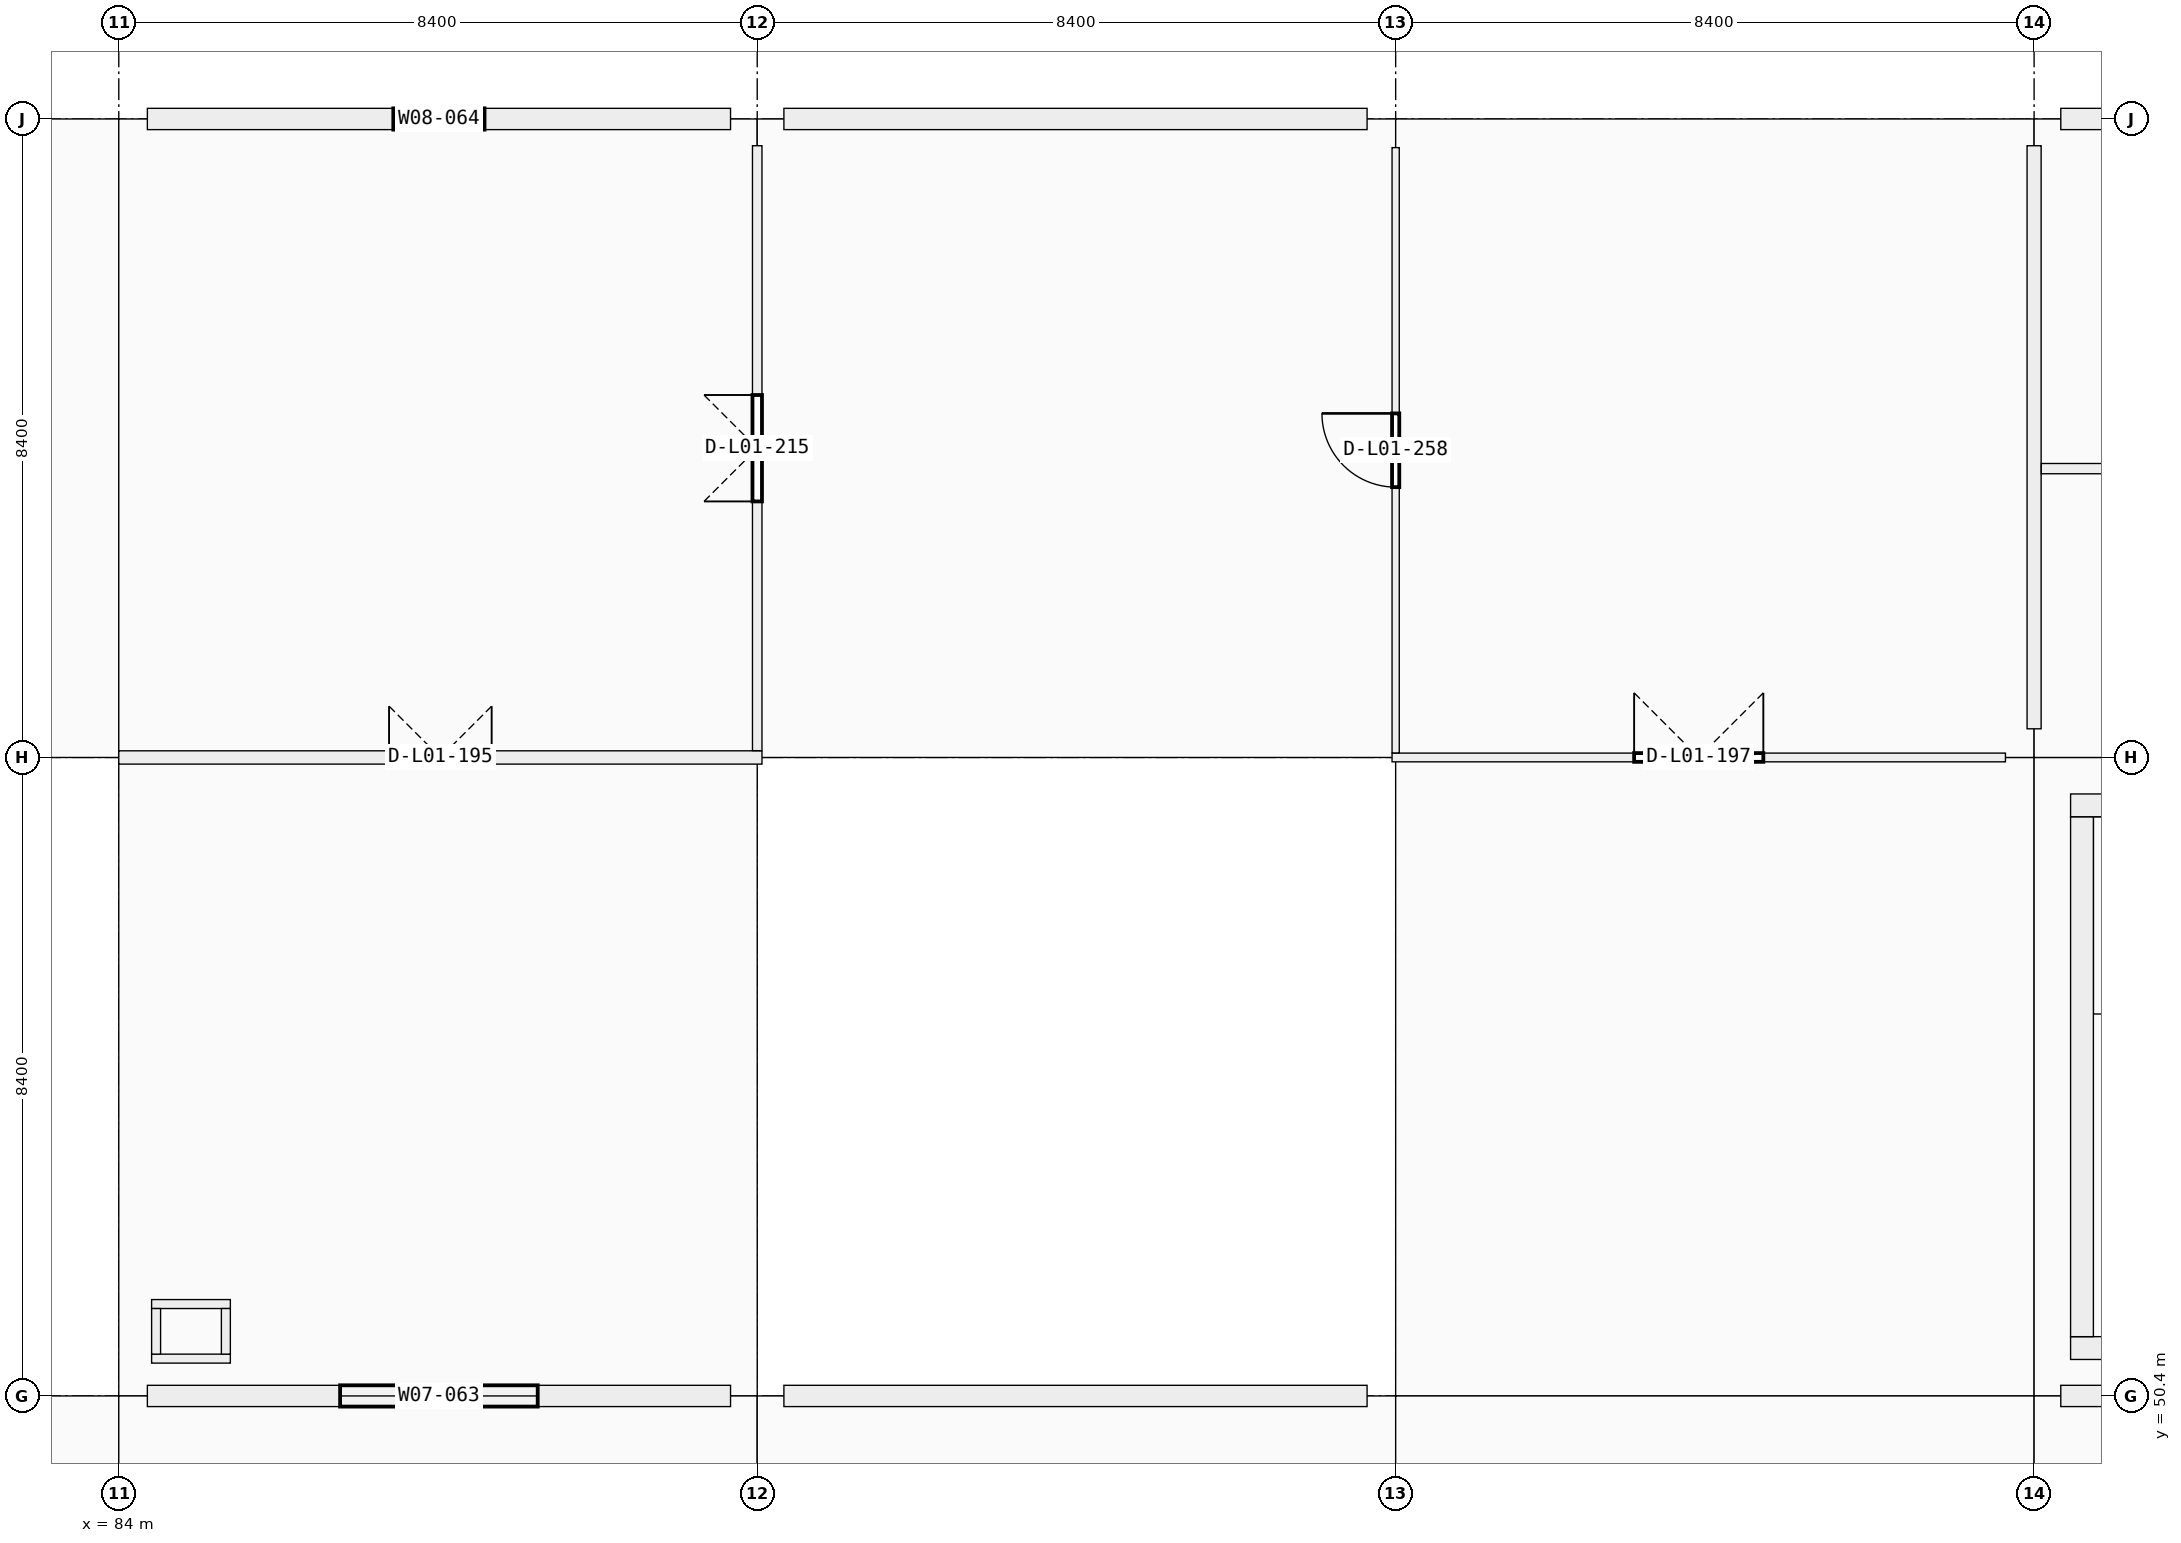
"""IFC4 building model, lengths in metres.
Left out: names, types, materials, properties, quantities, classifications, styles, units other than length and angle.
Written with IfcOpenShell. Run it as: python <this file> out.ifc"""

import sys

from ifc_helpers import new_model, si_unit, direction, frame, frame_2d, origin, origin_2d, place, context, subcontext, project, spatial, rectangle, extrude, element, fill, save


model = new_model("IFC4")
c1 = context("Model", 3, precision=1e-05, world=origin(), true_north=direction((0.0, 1.0)))
c2 = subcontext(c1, "Body", "Model", "MODEL_VIEW")
j1 = project(units=[si_unit("LENGTHUNIT", "METRE"), si_unit("PLANEANGLEUNIT", "RADIAN")], contexts=[c1])
p1 = place(None, origin())
s1 = spatial("IfcSite", under=j1, at=p1, CompositionType="ELEMENT")
p2 = place(p1, origin())
s2 = spatial("IfcBuilding", under=s1, at=p2, CompositionType="ELEMENT")
p3 = place(p2, frame((0.0, 0.0, 5.76)))
s3 = spatial("IfcBuildingStorey", under=s2, at=p3, CompositionType="ELEMENT", Elevation=5.76)
for number, where, z_axis, x_axis in (
    (1, (84.0, 50.4, 0.0), (0.0, 0.0, 1.0), (1.0, 0.0, 0.0)),
    (2, (84.0, 67.2, 0.0), (0.0, 0.0, 1.0), (1.0, 0.0, 0.0)),
):
    element("IfcColumn", number, at=place(p3, frame(where, z_axis=z_axis, x_axis=x_axis)), inside=s3, PredefinedType="COLUMN", context=c2, shape_type="SweptSolid", body=[
        extrude(rectangle(XDim=0.75, YDim=0.75, at=origin_2d()), origin(), (0.0, 0.0, 1.0), 4.5),
    ])
for number, where, z_axis, x_axis in (
    (3, (92.4, 50.4, 0.0), (0.0, 0.0, 1.0), (1.0, 0.0, 0.0)),
    (4, (92.4, 67.2, 0.0), (0.0, 0.0, 1.0), (1.0, 0.0, 0.0)),
):
    element("IfcColumn", number, at=place(p3, frame(where, z_axis=z_axis, x_axis=x_axis)), inside=s3, PredefinedType="COLUMN", context=c2, shape_type="SweptSolid", body=[
        extrude(rectangle(XDim=0.7, YDim=0.7, at=origin_2d()), origin(), (0.0, 0.0, 1.0), 4.5),
    ])
for number, where, z_axis, x_axis in (
    (5, (100.8, 50.4, 0.0), (0.0, 0.0, 1.0), (1.0, 0.0, 0.0)),
    (6, (100.8, 67.2, 0.0), (0.0, 0.0, 1.0), (1.0, 0.0, 0.0)),
):
    element("IfcColumn", number, at=place(p3, frame(where, z_axis=z_axis, x_axis=x_axis)), inside=s3, PredefinedType="COLUMN", context=c2, shape_type="SweptSolid", body=[
        extrude(rectangle(XDim=0.75, YDim=0.75, at=origin_2d()), origin(), (0.0, 0.0, 1.0), 4.5),
    ])
p4 = place(p3, frame((109.2, 50.4, 0.0), z_axis=(0.0, 0.0, 1.0), x_axis=(1.0, 0.0, 0.0)))
e7 = element("IfcColumn", 7, at=p4, inside=s3, PredefinedType="COLUMN", context=c2, shape_type="SweptSolid", body=[
    extrude(rectangle(XDim=0.7, YDim=0.7, at=origin_2d()), origin(), (0.0, 0.0, 1.0), 4.5),
])
p5 = place(p3, frame((109.2, 58.8, 0.0), z_axis=(0.0, 0.0, 1.0), x_axis=(1.0, 0.0, 0.0)))
e8 = element("IfcColumn", 8, at=p5, inside=s3, PredefinedType="COLUMN", context=c2, shape_type="SweptSolid", body=[
    extrude(rectangle(XDim=0.75, YDim=0.75, at=origin_2d()), origin(), (0.0, 0.0, 1.0), 4.5),
])
p6 = place(p3, frame((109.2, 67.2, 0.0), z_axis=(0.0, 0.0, 1.0), x_axis=(1.0, 0.0, 0.0)))
e9 = element("IfcColumn", 9, at=p6, inside=s3, PredefinedType="COLUMN", context=c2, shape_type="SweptSolid", body=[
    extrude(rectangle(XDim=0.7, YDim=0.7, at=origin_2d()), origin(), (0.0, 0.0, 1.0), 4.5),
])
p7 = place(p3, frame((92.049, 50.4, 0.0), z_axis=(0.0, 0.0, 1.0), x_axis=(-1.0, 0.0, 0.0)))
e10 = element("IfcWall", 10, at=p7, inside=s3, PredefinedType="SOLIDWALL", context=c2, shape_type="SweptSolid", body=[
    extrude(rectangle(XDim=7.673, YDim=0.28, at=frame_2d((3.836, 0.0))), origin(), (0.0, 0.0, 1.0), 3.4),
])
p8 = place(p7, frame((2.537, 0.0, 0.9)))
e11 = element("IfcOpeningElement", 11, at=p8, cuts=e10, PredefinedType="OPENING", context=c2, shape_type="SweptSolid", body=[
    extrude(rectangle(XDim=2.6, YDim=2.1, at=frame_2d((1.3, 1.05))), frame((0.0, 0.14, 0.0), z_axis=(0.0, -1.0, 0.0), x_axis=(1.0, 0.0, 0.0)), (0.0, 0.0, 1.0), 0.28),
])
p9 = place(p3, frame((84.376, 67.2, 0.0), z_axis=(0.0, 0.0, 1.0), x_axis=(1.0, 0.0, 0.0)))
e12 = element("IfcWall", 12, at=p9, inside=s3, PredefinedType="SOLIDWALL", context=c2, shape_type="SweptSolid", body=[
    extrude(rectangle(XDim=7.673, YDim=0.28, at=frame_2d((3.836, 0.0))), origin(), (0.0, 0.0, 1.0), 3.4),
])
p10 = place(p9, frame((3.236, 0.0, 0.9)))
e13 = element("IfcOpeningElement", 13, at=p10, cuts=e12, PredefinedType="OPENING", context=c2, shape_type="SweptSolid", body=[
    extrude(rectangle(XDim=1.2, YDim=2.1, at=frame_2d((0.6, 1.05))), frame((0.0, 0.14, 0.0), z_axis=(0.0, -1.0, 0.0), x_axis=(1.0, 0.0, 0.0)), (0.0, 0.0, 1.0), 0.28),
])
p11 = place(p3, frame((100.424, 50.4, 0.0), z_axis=(0.0, 0.0, 1.0), x_axis=(-1.0, 0.0, 0.0)))
e14 = element("IfcWall", 14, at=p11, inside=s3, PredefinedType="SOLIDWALL", context=c2, shape_type="SweptSolid", body=[
    extrude(rectangle(XDim=7.673, YDim=0.28, at=frame_2d((3.836, 0.0))), origin(), (0.0, 0.0, 1.0), 3.4),
])
p12 = place(p11, frame((2.736, 0.0, 0.9)))
e15 = element("IfcOpeningElement", 15, at=p12, cuts=e14, PredefinedType="OPENING", context=c2, shape_type="SweptSolid", body=[
    extrude(rectangle(XDim=2.2, YDim=1.75, at=frame_2d((1.1, 0.875))), frame((0.0, 0.14, 0.0), z_axis=(0.0, -1.0, 0.0), x_axis=(1.0, 0.0, 0.0)), (0.0, 0.0, 1.0), 0.28),
])
p13 = place(p3, frame((92.751, 67.2, 0.0), z_axis=(0.0, 0.0, 1.0), x_axis=(1.0, 0.0, 0.0)))
e16 = element("IfcWall", 16, at=p13, inside=s3, PredefinedType="SOLIDWALL", context=c2, shape_type="SweptSolid", body=[
    extrude(rectangle(XDim=7.673, YDim=0.28, at=frame_2d((3.836, 0.0))), origin(), (0.0, 0.0, 1.0), 3.4),
])
p14 = place(p13, frame((2.437, 0.0, 0.9)))
e17 = element("IfcOpeningElement", 17, at=p14, cuts=e16, PredefinedType="OPENING", context=c2, shape_type="SweptSolid", body=[
    extrude(rectangle(XDim=2.8, YDim=1.75, at=frame_2d((1.4, 0.875))), frame((0.0, 0.14, 0.0), z_axis=(0.0, -1.0, 0.0), x_axis=(1.0, 0.0, 0.0)), (0.0, 0.0, 1.0), 0.28),
])
p15 = place(p3, frame((117.224, 50.4, 0.0), z_axis=(0.0, 0.0, 1.0), x_axis=(-1.0, 0.0, 0.0)))
e18 = element("IfcWall", 18, at=p15, inside=s3, PredefinedType="SOLIDWALL", context=c2, shape_type="SweptSolid", body=[
    extrude(rectangle(XDim=7.673, YDim=0.28, at=frame_2d((3.836, 0.0))), origin(), (0.0, 0.0, 1.0), 3.4),
])
p16 = place(p3, frame((109.551, 67.2, 0.0), z_axis=(0.0, 0.0, 1.0), x_axis=(1.0, 0.0, 0.0)))
e19 = element("IfcWall", 19, at=p16, inside=s3, PredefinedType="SOLIDWALL", context=c2, shape_type="SweptSolid", body=[
    extrude(rectangle(XDim=7.723, YDim=0.28, at=frame_2d((3.861, 0.0))), origin(), (0.0, 0.0, 1.0), 3.4),
])
p17 = place(p16, frame((3.162, 0.0, 0.9)))
e20 = element("IfcOpeningElement", 20, at=p17, cuts=e19, PredefinedType="OPENING", context=c2, shape_type="SweptSolid", body=[
    extrude(rectangle(XDim=1.4, YDim=1.75, at=frame_2d((0.7, 0.875))), frame((0.0, 0.14, 0.0), z_axis=(0.0, -1.0, 0.0), x_axis=(1.0, 0.0, 0.0)), (0.0, 0.0, 1.0), 0.28),
])
p18 = place(p3, frame((117.12, 51.03, 0.0), z_axis=(0.0, 0.0, 1.0), x_axis=(-1.0, 0.0, 0.0)))
e21 = element("IfcWall", 21, at=p18, inside=s3, PredefinedType="SHEAR", context=c2, shape_type="SweptSolid", body=[
    extrude(rectangle(XDim=7.44, YDim=0.3, at=frame_2d((3.72, 0.0))), origin(), (0.0, 0.0, 1.0), 4.5),
])
p19 = place(p3, frame((109.83, 51.18, 0.0), z_axis=(0.0, 0.0, 1.0), x_axis=(0.0, 1.0, 0.0)))
e22 = element("IfcWall", 22, at=p19, inside=s3, PredefinedType="SHEAR", context=c2, shape_type="SweptSolid", body=[
    extrude(rectangle(XDim=6.84, YDim=0.3, at=frame_2d((3.42, 0.0))), origin(), (0.0, 0.0, 1.0), 4.5),
])
p20 = place(p3, frame((109.68, 58.17, 0.0), z_axis=(0.0, 0.0, 1.0), x_axis=(1.0, 0.0, 0.0)))
e23 = element("IfcWall", 23, at=p20, inside=s3, PredefinedType="SHEAR", context=c2, shape_type="SweptSolid", body=[
    extrude(rectangle(XDim=7.44, YDim=0.3, at=frame_2d((3.72, 0.0))), origin(), (0.0, 0.0, 1.0), 4.5),
])
for number, where, z_axis, x_axis in (
    (24, (84.432, 50.891, 0.0), (0.0, 0.0, 1.0), (1.0, 0.0, 0.0)),
    (25, (84.432, 51.609, 0.0), (0.0, 0.0, 1.0), (1.0, 0.0, 0.0)),
):
    element("IfcWall", number, at=place(p3, frame(where, z_axis=z_axis, x_axis=x_axis)), inside=s3, PredefinedType="PARTITIONING", context=c2, shape_type="SweptSolid", body=[
        extrude(rectangle(XDim=1.036, YDim=0.118, at=frame_2d((0.518, 0.0))), origin(), (0.0, 0.0, 1.0), 3.48),
    ])
p21 = place(p3, frame((84.491, 50.95, 0.0), z_axis=(0.0, 0.0, 1.0), x_axis=(0.0, 1.0, 0.0)))
e26 = element("IfcWall", 26, at=p21, inside=s3, PredefinedType="PARTITIONING", context=c2, shape_type="SweptSolid", body=[
    extrude(rectangle(XDim=0.6, YDim=0.118, at=frame_2d((0.3, 0.0))), origin(), (0.0, 0.0, 1.0), 2.4),
])
p22 = place(p3, frame((85.409, 50.95, 0.0), z_axis=(0.0, 0.0, 1.0), x_axis=(0.0, 1.0, 0.0)))
e27 = element("IfcWall", 27, at=p22, inside=s3, PredefinedType="PARTITIONING", context=c2, shape_type="SweptSolid", body=[
    extrude(rectangle(XDim=0.6, YDim=0.118, at=frame_2d((0.3, 0.0))), origin(), (0.0, 0.0, 1.0), 3.48),
])
p23 = place(p3, frame((84.0, 58.8, 0.0), z_axis=(0.0, 0.0, 1.0), x_axis=(1.0, 0.0, 0.0)))
e28 = element("IfcWall", 28, at=p23, inside=s3, PredefinedType="PARTITIONING", context=c2, shape_type="SweptSolid", body=[
    extrude(rectangle(XDim=8.462, YDim=0.175, at=frame_2d((4.231, 0.0))), origin(), (0.0, 0.0, 1.0), 2.4),
])
p24 = place(p23, frame((3.556, 0.0, 0.0)))
e29 = element("IfcOpeningElement", 29, at=p24, cuts=e28, PredefinedType="OPENING", context=c2, shape_type="SweptSolid", body=[
    extrude(rectangle(XDim=1.35, YDim=2.2, at=frame_2d((0.675, 1.1))), frame((0.0, 0.087, 0.0), z_axis=(0.0, -1.0, 0.0), x_axis=(1.0, 0.0, 0.0)), (0.0, 0.0, 1.0), 0.175),
])
p25 = place(p3, frame((100.752, 58.8, 0.0), z_axis=(0.0, 0.0, 1.0), x_axis=(1.0, 0.0, 0.0)))
e30 = element("IfcWall", 30, at=p25, inside=s3, PredefinedType="PARTITIONING", context=c2, shape_type="SweptSolid", body=[
    extrude(rectangle(XDim=8.071, YDim=0.115, at=frame_2d((4.035, 0.0))), origin(), (0.0, 0.0, 1.0), 2.4),
])
p26 = place(p25, frame((3.185, 0.0, 0.0)))
e31 = element("IfcOpeningElement", 31, at=p26, cuts=e30, PredefinedType="OPENING", context=c2, shape_type="SweptSolid", body=[
    extrude(rectangle(XDim=1.7, YDim=2.22, at=frame_2d((0.85, 1.11))), frame((0.0, 0.058, 0.0), z_axis=(0.0, -1.0, 0.0), x_axis=(1.0, 0.0, 0.0)), (0.0, 0.0, 1.0), 0.115),
])
p27 = place(p3, frame((92.4, 58.889, 0.0), z_axis=(0.0, 0.0, 1.0), x_axis=(0.0, 1.0, 0.0)))
e32 = element("IfcWall", 32, at=p27, inside=s3, PredefinedType="PARTITIONING", context=c2, shape_type="SweptSolid", body=[
    extrude(rectangle(XDim=7.958, YDim=0.125, at=frame_2d((3.979, 0.0))), origin(), (0.0, 0.0, 1.0), 2.4),
])
p28 = place(p27, frame((3.279, 0.0, 0.0)))
e33 = element("IfcOpeningElement", 33, at=p28, cuts=e32, PredefinedType="OPENING", context=c2, shape_type="SweptSolid", body=[
    extrude(rectangle(XDim=1.4, YDim=2.22, at=frame_2d((0.7, 1.11))), frame((0.0, 0.062, 0.0), z_axis=(0.0, -1.0, 0.0), x_axis=(1.0, 0.0, 0.0)), (0.0, 0.0, 1.0), 0.125),
])
p29 = place(p3, frame((100.8, 58.86, 0.0), z_axis=(0.0, 0.0, 1.0), x_axis=(0.0, 1.0, 0.0)))
e34 = element("IfcWall", 34, at=p29, inside=s3, PredefinedType="PARTITIONING", context=c2, shape_type="SweptSolid", body=[
    extrude(rectangle(XDim=7.963, YDim=0.095, at=frame_2d((3.982, 0.0))), origin(), (0.0, 0.0, 1.0), 2.4),
])
p30 = place(p29, frame((3.497, 0.0, 0.0)))
e35 = element("IfcOpeningElement", 35, at=p30, cuts=e34, PredefinedType="OPENING", context=c2, shape_type="SweptSolid", body=[
    extrude(rectangle(XDim=0.97, YDim=2.12, at=frame_2d((0.485, 1.06))), frame((0.0, 0.047, 0.0), z_axis=(0.0, -1.0, 0.0), x_axis=(1.0, 0.0, 0.0)), (0.0, 0.0, 1.0), 0.095),
])
p31 = place(p3, frame((109.2, 59.177, 0.0), z_axis=(0.0, 0.0, 1.0), x_axis=(0.0, 1.0, 0.0)))
e36 = element("IfcWall", 36, at=p31, inside=s3, PredefinedType="PARTITIONING", context=c2, shape_type="SweptSolid", body=[
    extrude(rectangle(XDim=7.671, YDim=0.185, at=frame_2d((3.835, 0.0))), origin(), (0.0, 0.0, 1.0), 2.4),
])
p32 = place(p3, frame((109.294, 62.6, 0.0), z_axis=(0.0, 0.0, 1.0), x_axis=(1.0, 0.0, 0.0)))
e37 = element("IfcWall", 37, at=p32, inside=s3, PredefinedType="PARTITIONING", context=c2, shape_type="SweptSolid", body=[
    extrude(rectangle(XDim=8.226, YDim=0.135, at=frame_2d((4.113, 0.0))), origin(), (0.0, 0.0, 1.0), 2.4),
])
p33 = place(p8, origin())
e38 = element("IfcWindow", 38, at=p33, inside=s3, PartitioningType="SINGLE_PANEL", PredefinedType="WINDOW", context=c2, shape_type="SweptSolid", body=[
    extrude(rectangle(XDim=2.6, YDim=2.1, at=frame_2d((1.3, 1.05))), frame((0.0, 0.03, 0.0), z_axis=(0.0, -1.0, 0.0), x_axis=(1.0, 0.0, 0.0)), (0.0, 0.0, 1.0), 0.06),
])
fill(e11, e38)
p34 = place(p10, origin())
e39 = element("IfcWindow", 39, at=p34, inside=s3, PartitioningType="SINGLE_PANEL", PredefinedType="WINDOW", context=c2, shape_type="SweptSolid", body=[
    extrude(rectangle(XDim=1.2, YDim=2.1, at=frame_2d((0.6, 1.05))), frame((0.0, 0.03, 0.0), z_axis=(0.0, -1.0, 0.0), x_axis=(1.0, 0.0, 0.0)), (0.0, 0.0, 1.0), 0.06),
])
fill(e13, e39)
p35 = place(p12, origin())
e40 = element("IfcWindow", 40, at=p35, inside=s3, PartitioningType="SINGLE_PANEL", PredefinedType="WINDOW", context=c2, shape_type="SweptSolid", body=[
    extrude(rectangle(XDim=2.2, YDim=1.75, at=frame_2d((1.1, 0.875))), frame((0.0, 0.03, 0.0), z_axis=(0.0, -1.0, 0.0), x_axis=(1.0, 0.0, 0.0)), (0.0, 0.0, 1.0), 0.06),
])
fill(e15, e40)
p36 = place(p14, origin())
e41 = element("IfcWindow", 41, at=p36, inside=s3, PartitioningType="SINGLE_PANEL", PredefinedType="WINDOW", context=c2, shape_type="SweptSolid", body=[
    extrude(rectangle(XDim=2.8, YDim=1.75, at=frame_2d((1.4, 0.875))), frame((0.0, 0.03, 0.0), z_axis=(0.0, -1.0, 0.0), x_axis=(1.0, 0.0, 0.0)), (0.0, 0.0, 1.0), 0.06),
])
fill(e17, e41)
p37 = place(p24, origin())
e42 = element("IfcDoor", 42, at=p37, inside=s3, OperationType="DOUBLE_DOOR_SINGLE_SWING", PredefinedType="DOOR", context=c2, shape_type="SweptSolid", body=[
    extrude(rectangle(XDim=1.35, YDim=2.2, at=frame_2d((0.675, 1.1))), frame((0.0, 0.025, 0.0), z_axis=(0.0, -1.0, 0.0), x_axis=(1.0, 0.0, 0.0)), (0.0, 0.0, 1.0), 0.05),
])
fill(e29, e42)
p38 = place(p26, origin())
e43 = element("IfcDoor", 43, at=p38, inside=s3, OperationType="DOUBLE_DOOR_SINGLE_SWING", PredefinedType="DOOR", context=c2, shape_type="SweptSolid", body=[
    extrude(rectangle(XDim=1.7, YDim=2.22, at=frame_2d((0.85, 1.11))), frame((0.0, 0.025, 0.0), z_axis=(0.0, -1.0, 0.0), x_axis=(1.0, 0.0, 0.0)), (0.0, 0.0, 1.0), 0.05),
])
fill(e31, e43)
p39 = place(p28, origin())
e44 = element("IfcDoor", 44, at=p39, inside=s3, OperationType="DOUBLE_DOOR_SINGLE_SWING", PredefinedType="DOOR", context=c2, shape_type="SweptSolid", body=[
    extrude(rectangle(XDim=1.4, YDim=2.22, at=frame_2d((0.7, 1.11))), frame((0.0, 0.025, 0.0), z_axis=(0.0, -1.0, 0.0), x_axis=(1.0, 0.0, 0.0)), (0.0, 0.0, 1.0), 0.05),
])
fill(e33, e44)
p40 = place(p30, origin())
e45 = element("IfcDoor", 45, at=p40, inside=s3, OperationType="SINGLE_SWING_RIGHT", PredefinedType="DOOR", context=c2, shape_type="SweptSolid", body=[
    extrude(rectangle(XDim=0.97, YDim=2.12, at=frame_2d((0.485, 1.06))), frame((0.0, 0.025, 0.0), z_axis=(0.0, -1.0, 0.0), x_axis=(1.0, 0.0, 0.0)), (0.0, 0.0, 1.0), 0.05),
])
fill(e35, e45)
save(model, sys.argv[1])
